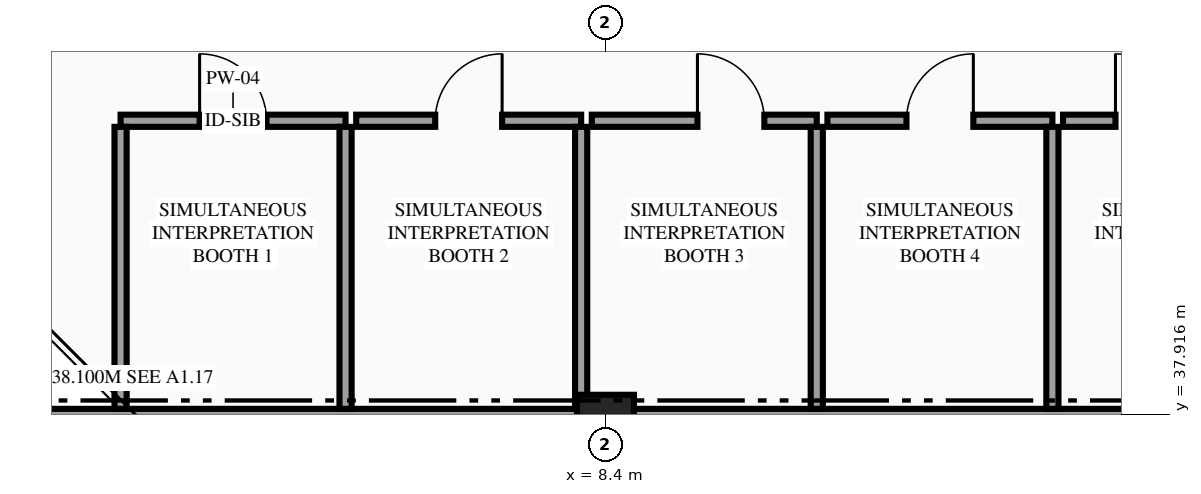
"""IFC4 building model, lengths in metres.
Left out: names, types, materials, properties, quantities, classifications, styles, units other than length and angle.
Written with IfcOpenShell. Run it as: python <this file> out.ifc"""

import sys

from ifc_helpers import new_model, si_unit, direction, frame, frame_2d, origin, origin_2d, place, context, subcontext, project, spatial, rectangle, extrude, element, fill, save


model = new_model("IFC4")
c1 = context("Model", 3, precision=1e-05, world=origin(), true_north=direction((0.0, 1.0)))
c2 = subcontext(c1, "Body", "Model", "MODEL_VIEW")
j1 = project(units=[si_unit("LENGTHUNIT", "METRE"), si_unit("PLANEANGLEUNIT", "RADIAN")], contexts=[c1])
p1 = place(None, origin())
s1 = spatial("IfcSite", under=j1, at=p1, CompositionType="ELEMENT")
p2 = place(p1, origin())
s2 = spatial("IfcBuilding", under=s1, at=p2, CompositionType="ELEMENT")
p3 = place(p2, frame((0.0, 0.0, 5.4)))
s3 = spatial("IfcBuildingStorey", under=s2, at=p3, CompositionType="ELEMENT", Elevation=5.4)
p4 = place(p3, frame((8.4, 37.8, 0.0), z_axis=(0.0, 0.0, 1.0), x_axis=(1.0, 0.0, 0.0)))
e1 = element("IfcColumn", 1, at=p4, inside=s3, PredefinedType="COLUMN", context=c2, shape_type="SweptSolid", body=[
    extrude(rectangle(XDim=0.75, YDim=0.75, at=origin_2d()), origin(), (0.0, 0.0, 1.0), 4.5),
])
p5 = place(p3, frame((0.0, 37.8, 0.0), z_axis=(0.0, 0.0, 1.0), x_axis=(1.0, 0.0, 0.0)))
e2 = element("IfcWall", 2, at=p5, inside=s3, PredefinedType="STANDARD", context=c2, shape_type="SweptSolid", body=[
    extrude(rectangle(XDim=8.4, YDim=0.38, at=frame_2d((4.2, 0.0))), origin(), (0.0, 0.0, 1.0), 3.993),
])
p6 = place(p3, frame((8.4, 37.8, 0.0), z_axis=(0.0, 0.0, 1.0), x_axis=(1.0, 0.0, 0.0)))
e3 = element("IfcWall", 3, at=p6, inside=s3, PredefinedType="STANDARD", context=c2, shape_type="SweptSolid", body=[
    extrude(rectangle(XDim=8.4, YDim=0.38, at=frame_2d((4.2, 0.0))), origin(), (0.0, 0.0, 1.0), 3.556),
])
p7 = place(p3, frame((2.02, 41.78, 0.0), z_axis=(0.0, 0.0, 1.0), x_axis=(1.0, 0.0, 0.0)))
e4 = element("IfcWall", 4, at=p7, inside=s3, PredefinedType="PARTITIONING", context=c2, shape_type="SweptSolid", body=[
    extrude(rectangle(XDim=2.96, YDim=0.16, at=frame_2d((1.48, 0.0))), origin(), (0.0, 0.0, 1.0), 4.235),
])
p8 = place(p7, frame((1.04, 0.0, 0.0)))
e5 = element("IfcOpeningElement", 5, at=p8, cuts=e4, PredefinedType="OPENING", context=c2, shape_type="SweptSolid", body=[
    extrude(rectangle(XDim=0.88, YDim=2.05, at=frame_2d((0.44, 1.025))), frame((0.0, 0.09, 0.0), z_axis=(0.0, -1.0, 0.0), x_axis=(1.0, 0.0, 0.0)), (0.0, 0.0, 1.0), 0.18),
])
for number, where, z_axis, x_axis in (
    (6, (2.02, 37.99, 0.0), (0.0, 0.0, 1.0), (0.0, 1.0, 0.0)),
    (7, (4.98, 37.99, 0.0), (0.0, 0.0, 1.0), (0.0, 1.0, 0.0)),
):
    element("IfcWall", number, at=place(p3, frame(where, z_axis=z_axis, x_axis=x_axis)), inside=s3, PredefinedType="PARTITIONING", context=c2, shape_type="SweptSolid", body=[
        extrude(rectangle(XDim=3.71, YDim=0.16, at=frame_2d((1.855, 0.0))), origin(), (0.0, 0.0, 1.0), 4.235),
    ])
p9 = place(p3, frame((5.12, 41.78, 0.0), z_axis=(0.0, 0.0, 1.0), x_axis=(1.0, 0.0, 0.0)))
e8 = element("IfcWall", 8, at=p9, inside=s3, PredefinedType="PARTITIONING", context=c2, shape_type="SweptSolid", body=[
    extrude(rectangle(XDim=2.96, YDim=0.16, at=frame_2d((1.48, 0.0))), origin(), (0.0, 0.0, 1.0), 4.235),
])
p10 = place(p9, frame((1.04, 0.0, 0.0)))
e9 = element("IfcOpeningElement", 9, at=p10, cuts=e8, PredefinedType="OPENING", context=c2, shape_type="SweptSolid", body=[
    extrude(rectangle(XDim=0.88, YDim=2.05, at=frame_2d((0.44, 1.025))), frame((0.0, 0.09, 0.0), z_axis=(0.0, -1.0, 0.0), x_axis=(1.0, 0.0, 0.0)), (0.0, 0.0, 1.0), 0.18),
])
p11 = place(p3, frame((8.08, 37.99, 0.0), z_axis=(0.0, 0.0, 1.0), x_axis=(0.0, 1.0, 0.0)))
e10 = element("IfcWall", 10, at=p11, inside=s3, PredefinedType="PARTITIONING", context=c2, shape_type="SweptSolid", body=[
    extrude(rectangle(XDim=3.71, YDim=0.16, at=frame_2d((1.855, 0.0))), origin(), (0.0, 0.0, 1.0), 4.235),
])
p12 = place(p3, frame((8.22, 41.78, 0.0), z_axis=(0.0, 0.0, 1.0), x_axis=(1.0, 0.0, 0.0)))
e11 = element("IfcWall", 11, at=p12, inside=s3, PredefinedType="PARTITIONING", context=c2, shape_type="SweptSolid", body=[
    extrude(rectangle(XDim=2.96, YDim=0.16, at=frame_2d((1.48, 0.0))), origin(), (0.0, 0.0, 1.0), 4.235),
])
p13 = place(p12, frame((1.39, 0.0, 0.0)))
e12 = element("IfcOpeningElement", 12, at=p13, cuts=e11, PredefinedType="OPENING", context=c2, shape_type="SweptSolid", body=[
    extrude(rectangle(XDim=0.88, YDim=2.05, at=frame_2d((0.44, 1.025))), frame((0.0, 0.09, 0.0), z_axis=(0.0, -1.0, 0.0), x_axis=(1.0, 0.0, 0.0)), (0.0, 0.0, 1.0), 0.18),
])
p14 = place(p3, frame((11.18, 37.99, 0.0), z_axis=(0.0, 0.0, 1.0), x_axis=(0.0, 1.0, 0.0)))
e13 = element("IfcWall", 13, at=p14, inside=s3, PredefinedType="PARTITIONING", context=c2, shape_type="SweptSolid", body=[
    extrude(rectangle(XDim=3.71, YDim=0.16, at=frame_2d((1.855, 0.0))), origin(), (0.0, 0.0, 1.0), 4.235),
])
p15 = place(p3, frame((11.32, 41.78, 0.0), z_axis=(0.0, 0.0, 1.0), x_axis=(1.0, 0.0, 0.0)))
e14 = element("IfcWall", 14, at=p15, inside=s3, PredefinedType="PARTITIONING", context=c2, shape_type="SweptSolid", body=[
    extrude(rectangle(XDim=2.96, YDim=0.16, at=frame_2d((1.48, 0.0))), origin(), (0.0, 0.0, 1.0), 4.235),
])
p16 = place(p15, frame((1.04, 0.0, 0.0)))
e15 = element("IfcOpeningElement", 15, at=p16, cuts=e14, PredefinedType="OPENING", context=c2, shape_type="SweptSolid", body=[
    extrude(rectangle(XDim=0.88, YDim=2.05, at=frame_2d((0.44, 1.025))), frame((0.0, 0.09, 0.0), z_axis=(0.0, -1.0, 0.0), x_axis=(1.0, 0.0, 0.0)), (0.0, 0.0, 1.0), 0.18),
])
p17 = place(p3, frame((14.28, 37.99, 0.0), z_axis=(0.0, 0.0, 1.0), x_axis=(0.0, 1.0, 0.0)))
e16 = element("IfcWall", 16, at=p17, inside=s3, PredefinedType="PARTITIONING", context=c2, shape_type="SweptSolid", body=[
    extrude(rectangle(XDim=3.71, YDim=0.16, at=frame_2d((1.855, 0.0))), origin(), (0.0, 0.0, 1.0), 4.235),
])
p18 = place(p3, frame((14.42, 41.78, 0.0), z_axis=(0.0, 0.0, 1.0), x_axis=(1.0, 0.0, 0.0)))
e17 = element("IfcWall", 17, at=p18, inside=s3, PredefinedType="PARTITIONING", context=c2, shape_type="SweptSolid", body=[
    extrude(rectangle(XDim=2.96, YDim=0.16, at=frame_2d((1.48, 0.0))), origin(), (0.0, 0.0, 1.0), 4.235),
])
p19 = place(p18, frame((0.69, 0.0, 0.0)))
e18 = element("IfcOpeningElement", 18, at=p19, cuts=e17, PredefinedType="OPENING", context=c2, shape_type="SweptSolid", body=[
    extrude(rectangle(XDim=0.88, YDim=2.05, at=frame_2d((0.44, 1.025))), frame((0.0, 0.09, 0.0), z_axis=(0.0, -1.0, 0.0), x_axis=(1.0, 0.0, 0.0)), (0.0, 0.0, 1.0), 0.18),
])
p20 = place(p8, origin())
e19 = element("IfcDoor", 19, at=p20, inside=s3, OperationType="SINGLE_SWING_LEFT", PredefinedType="DOOR", context=c2, shape_type="SweptSolid", body=[
    extrude(rectangle(XDim=0.88, YDim=2.05, at=frame_2d((0.44, 1.025))), frame((0.0, 0.025, 0.0), z_axis=(0.0, -1.0, 0.0), x_axis=(1.0, 0.0, 0.0)), (0.0, 0.0, 1.0), 0.05),
])
fill(e5, e19)
p21 = place(p10, origin())
e20 = element("IfcDoor", 20, at=p21, inside=s3, OperationType="SINGLE_SWING_RIGHT", PredefinedType="DOOR", context=c2, shape_type="SweptSolid", body=[
    extrude(rectangle(XDim=0.88, YDim=2.05, at=frame_2d((0.44, 1.025))), frame((0.0, 0.025, 0.0), z_axis=(0.0, -1.0, 0.0), x_axis=(1.0, 0.0, 0.0)), (0.0, 0.0, 1.0), 0.05),
])
fill(e9, e20)
p22 = place(p13, origin())
e21 = element("IfcDoor", 21, at=p22, inside=s3, OperationType="SINGLE_SWING_LEFT", PredefinedType="DOOR", context=c2, shape_type="SweptSolid", body=[
    extrude(rectangle(XDim=0.88, YDim=2.05, at=frame_2d((0.44, 1.025))), frame((0.0, 0.025, 0.0), z_axis=(0.0, -1.0, 0.0), x_axis=(1.0, 0.0, 0.0)), (0.0, 0.0, 1.0), 0.05),
])
fill(e12, e21)
p23 = place(p16, origin())
e22 = element("IfcDoor", 22, at=p23, inside=s3, OperationType="SINGLE_SWING_RIGHT", PredefinedType="DOOR", context=c2, shape_type="SweptSolid", body=[
    extrude(rectangle(XDim=0.88, YDim=2.05, at=frame_2d((0.44, 1.025))), frame((0.0, 0.025, 0.0), z_axis=(0.0, -1.0, 0.0), x_axis=(1.0, 0.0, 0.0)), (0.0, 0.0, 1.0), 0.05),
])
fill(e15, e22)
p24 = place(p19, origin())
e23 = element("IfcDoor", 23, at=p24, inside=s3, OperationType="SINGLE_SWING_LEFT", PredefinedType="DOOR", context=c2, shape_type="SweptSolid", body=[
    extrude(rectangle(XDim=0.88, YDim=2.05, at=frame_2d((0.44, 1.025))), frame((0.0, 0.025, 0.0), z_axis=(0.0, -1.0, 0.0), x_axis=(1.0, 0.0, 0.0)), (0.0, 0.0, 1.0), 0.05),
])
fill(e18, e23)
save(model, sys.argv[1])
